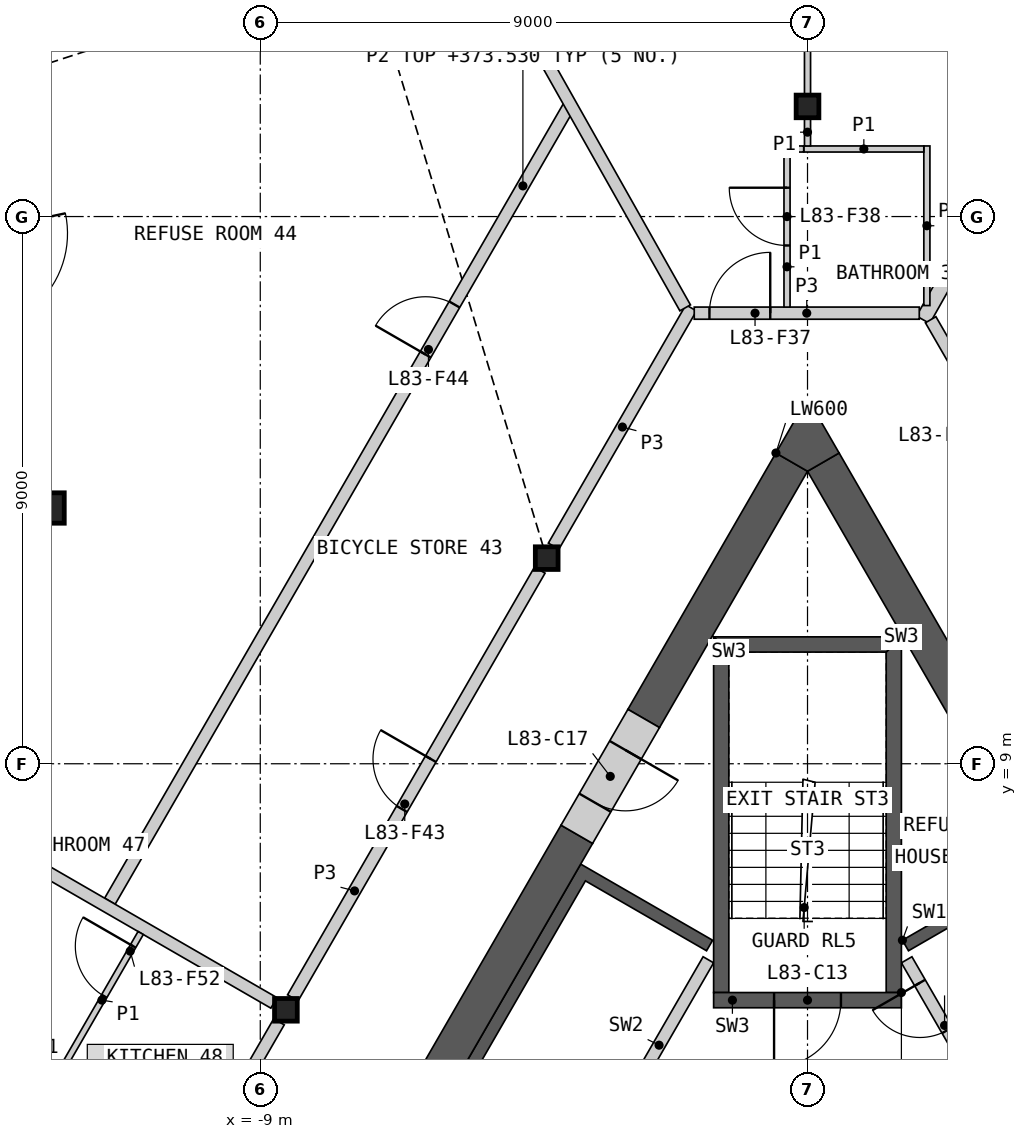
"""IFC4 building model, lengths in metres.
Left out: names, types, materials, properties, quantities, classifications, styles, units other than length and angle.
Written with IfcOpenShell. Run it as: python <this file> out.ifc"""

import sys

from ifc_helpers import new_model, si_unit, direction, frame, frame_2d, origin, origin_2d, place, context, subcontext, project, spatial, polyline, rectangle, hollow_rectangle, i_section, outline, extrude, element, fill, save


model = new_model("IFC4")
c1 = context("Model", 3, precision=1e-05, world=origin(), true_north=direction((0.0, 1.0)))
c2 = subcontext(c1, "Body", "Model", "MODEL_VIEW")
j1 = project(units=[si_unit("LENGTHUNIT", "METRE"), si_unit("PLANEANGLEUNIT", "RADIAN")], contexts=[c1])
p1 = place(None, origin())
s1 = spatial("IfcSite", under=j1, at=p1, CompositionType="ELEMENT")
p2 = place(p1, origin())
s2 = spatial("IfcBuilding", under=s1, at=p2, CompositionType="ELEMENT")
p3 = place(p2, frame((0.0, 0.0, 371.2)))
s3 = spatial("IfcBuildingStorey", under=s2, at=p3, CompositionType="ELEMENT", Elevation=371.2)
p4 = place(p3, frame((-12.474, 13.206, 0.0), z_axis=(0.0, 0.0, 1.0), x_axis=(1.0, 0.0, 0.0)))
e1 = element("IfcColumn", 1, at=p4, inside=s3, PredefinedType="COLUMN", context=c2, shape_type="SweptSolid", body=[
    extrude(hollow_rectangle(XDim=0.5, YDim=0.5, WallThickness=0.03, at=origin_2d()), origin(), (0.0, 0.0, 1.0), 3.4),
])
for number, where, z_axis, x_axis in (
    (2, (0.0, 19.811, 0.0), (0.0, 0.0, 1.0), (1.0, 0.0, 0.0)),
    (3, (-4.289, 12.382, 0.0), (0.0, 0.0, 1.0), (1.0, 0.0, 0.0)),
    (4, (-8.578, 4.953, 0.0), (0.0, 0.0, 1.0), (1.0, 0.0, 0.0)),
):
    element("IfcColumn", number, at=place(p3, frame(where, z_axis=z_axis, x_axis=x_axis)), inside=s3, PredefinedType="COLUMN", context=c2, shape_type="SweptSolid", body=[
        extrude(i_section(OverallWidth=0.374, OverallDepth=0.372, WebThickness=0.016, FlangeThickness=0.026, at=origin_2d()), origin(), (0.0, 0.0, 1.0), 3.4),
    ])
p5 = place(p3, origin())
e5 = element("IfcWall", 5, at=p5, inside=s3, PredefinedType="SHEAR", context=c2, shape_type="SweptSolid", body=[
    extrude(outline(polyline([(1.561, 6.097), (3.731, 7.35), (8.231, -0.444), (6.061, -1.697), (5.96, -1.524), (7.952, -0.374), (6.952, 1.358), (4.96, 0.208), (4.861, 0.381), (6.852, 1.531), (5.852, 3.263), (3.861, 2.113), (3.76, 2.287), (5.752, 3.437), (4.752, 5.169), (2.76, 4.019), (2.66, 4.192), (4.652, 5.342), (3.652, 7.074), (1.66, 5.924), (1.561, 6.097)])), origin(), (0.0, 0.0, 1.0), 3.1),
])
p6 = place(p3, frame((5.817, -1.476, 0.0), z_axis=(0.0, 0.0, 1.0), x_axis=(-0.500002616675, 0.866023893041, 0.0)))
e6 = element("IfcWall", 6, at=p6, inside=s3, PredefinedType="SOLIDWALL", context=c2, shape_type="SweptSolid", body=[
    extrude(rectangle(XDim=8.373, YDim=0.2, at=frame_2d((4.187, 0.0))), origin(), (0.0, 0.0, 1.0), 3.1),
])
p7 = place(p6, frame((0.337, 0.0, 0.0)))
e7 = element("IfcOpeningElement", 7, at=p7, cuts=e6, PredefinedType="OPENING", context=c2, shape_type="SweptSolid", body=[
    extrude(rectangle(XDim=1.1, YDim=2.1, at=frame_2d((0.55, 1.05))), frame((0.0, 0.11, 0.0), z_axis=(0.0, -1.0, 0.0), x_axis=(1.0, 0.0, 0.0)), (0.0, 0.0, 1.0), 0.22),
])
p8 = place(p6, frame((2.537, 0.0, 0.0)))
e8 = element("IfcOpeningElement", 8, at=p8, cuts=e6, PredefinedType="OPENING", context=c2, shape_type="SweptSolid", body=[
    extrude(rectangle(XDim=1.1, YDim=2.1, at=frame_2d((0.55, 1.05))), frame((0.0, 0.11, 0.0), z_axis=(0.0, -1.0, 0.0), x_axis=(1.0, 0.0, 0.0)), (0.0, 0.0, 1.0), 0.22),
])
p9 = place(p6, frame((4.737, 0.0, 0.0)))
e9 = element("IfcOpeningElement", 9, at=p9, cuts=e6, PredefinedType="OPENING", context=c2, shape_type="SweptSolid", body=[
    extrude(rectangle(XDim=1.1, YDim=2.1, at=frame_2d((0.55, 1.05))), frame((0.0, 0.11, 0.0), z_axis=(0.0, -1.0, 0.0), x_axis=(1.0, 0.0, 0.0)), (0.0, 0.0, 1.0), 0.22),
])
p10 = place(p6, frame((7.037, 0.0, 0.0)))
e10 = element("IfcOpeningElement", 10, at=p10, cuts=e6, PredefinedType="OPENING", context=c2, shape_type="SweptSolid", body=[
    extrude(rectangle(XDim=0.9, YDim=2.1, at=frame_2d((0.45, 1.05))), frame((0.0, 0.11, 0.0), z_axis=(0.0, -1.0, 0.0), x_axis=(1.0, 0.0, 0.0)), (0.0, 0.0, 1.0), 0.22),
])
p11 = place(p3, origin())
e11 = element("IfcWall", 11, at=p11, inside=s3, PredefinedType="SHEAR", context=c2, shape_type="SweptSolid", body=[
    extrude(outline(polyline([(-4.96, 0.208), (-7.131, 1.461), (-3.731, 7.35), (-1.561, 6.097), (-1.66, 5.924), (-3.652, 7.074), (-6.852, 1.531), (-4.861, 0.381), (-4.96, 0.208)])), origin(), (0.0, 0.0, 1.0), 3.1),
])
p12 = place(p3, frame((-1.631, 5.776, 0.0), z_axis=(0.0, 0.0, 1.0), x_axis=(-0.499992876559, -0.866029516466, 0.0)))
e12 = element("IfcWall", 12, at=p12, inside=s3, PredefinedType="SOLIDWALL", context=c2, shape_type="SweptSolid", body=[
    extrude(rectangle(XDim=6.486, YDim=0.2, at=frame_2d((3.243, 0.0))), origin(), (0.0, 0.0, 1.0), 3.1),
])
p13 = place(p12, frame((2.637, 0.0, 0.0)))
e13 = element("IfcOpeningElement", 13, at=p13, cuts=e12, PredefinedType="OPENING", context=c2, shape_type="SweptSolid", body=[
    extrude(rectangle(XDim=0.9, YDim=2.1, at=frame_2d((0.45, 1.05))), frame((0.0, 0.11, 0.0), z_axis=(0.0, -1.0, 0.0), x_axis=(1.0, 0.0, 0.0)), (0.0, 0.0, 1.0), 0.22),
])
p14 = place(p3, origin())
e14 = element("IfcWall", 14, at=p14, inside=s3, PredefinedType="SHEAR", context=c2, shape_type="SweptSolid", body=[
    extrude(outline(polyline([(1.544, 5.237), (1.544, 11.087), (1.294, 10.837), (1.294, 5.237), (1.544, 5.237)])), origin(), (0.0, 0.0, 1.0), 3.1),
])
p15 = place(p3, origin())
e15 = element("IfcWall", 15, at=p15, inside=s3, PredefinedType="SHEAR", context=c2, shape_type="SweptSolid", body=[
    extrude(outline(polyline([(1.544, 11.087), (-1.544, 11.087), (-1.294, 10.837), (1.294, 10.837), (1.544, 11.087)])), origin(), (0.0, 0.0, 1.0), 3.1),
])
p16 = place(p3, origin())
e16 = element("IfcWall", 16, at=p16, inside=s3, PredefinedType="SHEAR", context=c2, shape_type="SweptSolid", body=[
    extrude(outline(polyline([(-1.294, 10.837), (-1.544, 11.087), (-1.544, 5.237), (-1.294, 5.237), (-1.294, 10.837)])), origin(), (0.0, 0.0, 1.0), 3.1),
])
p17 = place(p3, frame((1.544, 5.112, 0.0), z_axis=(0.0, 0.0, 1.0), x_axis=(-1.0, 0.0, 0.0)))
e17 = element("IfcWall", 17, at=p17, inside=s3, PredefinedType="SHEAR", context=c2, shape_type="SweptSolid", body=[
    extrude(rectangle(XDim=3.088, YDim=0.25, at=frame_2d((1.544, 0.0))), origin(), (0.0, 0.0, 1.0), 3.1),
])
p18 = place(p17, frame((0.994, 0.0, 0.0)))
e18 = element("IfcOpeningElement", 18, at=p18, cuts=e17, PredefinedType="OPENING", context=c2, shape_type="SweptSolid", body=[
    extrude(rectangle(XDim=1.1, YDim=2.1, at=frame_2d((0.55, 1.05))), frame((0.0, 0.135, 0.0), z_axis=(0.0, -1.0, 0.0), x_axis=(1.0, 0.0, 0.0)), (0.0, 0.0, 1.0), 0.27),
])
p19 = place(p3, frame((8.686, -0.634, 0.0), z_axis=(0.0, 0.0, 1.0), x_axis=(-0.500004601921, 0.866022746848, 0.0)))
e19 = element("IfcWall", 19, at=p19, inside=s3, PredefinedType="SHEAR", context=c2, shape_type="SweptSolid", body=[
    extrude(rectangle(XDim=16.853, YDim=0.6, at=frame_2d((8.426, 0.0))), origin(), (0.0, 0.0, 1.0), 3.1),
])
p20 = place(p3, frame((-3.794, 7.84, 0.0), z_axis=(0.0, 0.0, 1.0), x_axis=(-0.499974747889, -0.866039982607, 0.0)))
e20 = element("IfcWall", 20, at=p20, inside=s3, PredefinedType="SHEAR", context=c2, shape_type="SweptSolid", body=[
    extrude(rectangle(XDim=7.092, YDim=0.6, at=frame_2d((3.546, 0.0))), origin(), (0.0, 0.0, 1.0), 3.1),
])
p21 = place(p3, frame((-0.26, 13.961, 0.0), z_axis=(0.0, 0.0, 1.0), x_axis=(-0.50000604952, -0.866021911064, 0.0)))
e21 = element("IfcWall", 21, at=p21, inside=s3, PredefinedType="SHEAR", context=c2, shape_type="SweptSolid", body=[
    extrude(rectangle(XDim=4.869, YDim=0.6, at=frame_2d((2.434, 0.0))), origin(), (0.0, 0.0, 1.0), 3.1),
])
p22 = place(p3, origin())
e22 = element("IfcWall", 22, at=p22, inside=s3, PredefinedType="SHEAR", context=c2, shape_type="SweptSolid", body=[
    extrude(outline(polyline([(-0.52, 14.111), (0.0, 15.011), (0.52, 14.111), (0.0, 13.811), (-0.52, 14.111)])), origin(), (0.0, 0.0, 1.0), 3.1),
])
p23 = place(p3, frame((-2.694, 9.745, 0.0), z_axis=(0.0, 0.0, 1.0), x_axis=(-0.50002983664, -0.866008176907, 0.0)))
e23 = element("IfcWall", 23, at=p23, inside=s3, PredefinedType="SHEAR", context=c2, shape_type="SweptSolid", body=[
    extrude(rectangle(XDim=2.2, YDim=0.6, at=frame_2d((1.1, 0.0))), origin(), (0.0, 0.0, 1.0), 3.1),
])
p24 = place(p23, frame((0.6, 0.0, 0.0)))
e24 = element("IfcOpeningElement", 24, at=p24, cuts=e23, PredefinedType="OPENING", context=c2, shape_type="SweptSolid", body=[
    extrude(rectangle(XDim=1.0, YDim=2.1, at=frame_2d((0.5, 1.05))), frame((0.0, 0.31, 0.0), z_axis=(0.0, -1.0, 0.0), x_axis=(1.0, 0.0, 0.0)), (0.0, 0.0, 1.0), 0.62),
])
p25 = place(p3, frame((1.902, 16.302, 0.0), z_axis=(0.0, 0.0, 1.0), x_axis=(0.491233789602, 0.871027763021, 0.0)))
e25 = element("IfcWall", 25, at=p25, inside=s3, PredefinedType="PARTITIONING", context=c2, shape_type="SweptSolid", body=[
    extrude(rectangle(XDim=14.345, YDim=0.25, at=frame_2d((7.173, 0.0))), origin(), (0.0, 0.0, 1.0), 2.33),
])
p26 = place(p3, frame((-8.465, 5.15, 0.0), z_axis=(0.0, 0.0, 1.0), x_axis=(0.499992155518, 0.866029932751, 0.0)))
e26 = element("IfcWall", 26, at=p26, inside=s3, PredefinedType="PARTITIONING", context=c2, shape_type="SweptSolid", body=[
    extrude(rectangle(XDim=8.123, YDim=0.2, at=frame_2d((4.062, 0.0))), origin(), (0.0, 0.0, 1.0), 3.1),
])
p27 = place(p26, frame((3.587, 0.0, 0.0)))
e27 = element("IfcOpeningElement", 27, at=p27, cuts=e26, PredefinedType="OPENING", context=c2, shape_type="SweptSolid", body=[
    extrude(rectangle(XDim=0.95, YDim=2.1, at=frame_2d((0.475, 1.05))), frame((0.0, 0.11, 0.0), z_axis=(0.0, -1.0, 0.0), x_axis=(1.0, 0.0, 0.0)), (0.0, 0.0, 1.0), 0.22),
])
p28 = place(p3, frame((-12.754, -2.279, 0.0), z_axis=(0.0, 0.0, 1.0), x_axis=(0.500001682468, 0.866024432409, 0.0)))
e28 = element("IfcWall", 28, at=p28, inside=s3, PredefinedType="PARTITIONING", context=c2, shape_type="SweptSolid", body=[
    extrude(rectangle(XDim=8.124, YDim=0.2, at=frame_2d((4.062, 0.0))), origin(), (0.0, 0.0, 1.0), 3.1),
])
p29 = place(p28, frame((3.762, 0.0, 0.0)))
e29 = element("IfcOpeningElement", 29, at=p29, cuts=e28, PredefinedType="OPENING", context=c2, shape_type="SweptSolid", body=[
    extrude(rectangle(XDim=1.0, YDim=2.1, at=frame_2d((0.5, 1.05))), frame((0.0, 0.11, 0.0), z_axis=(0.0, -1.0, 0.0), x_axis=(1.0, 0.0, 0.0)), (0.0, 0.0, 1.0), 0.22),
])
p30 = place(p3, frame((-4.176, 12.579, 0.0), z_axis=(0.0, 0.0, 1.0), x_axis=(0.499974648164, 0.866040040179, 0.0)))
e30 = element("IfcWall", 30, at=p30, inside=s3, PredefinedType="PARTITIONING", context=c2, shape_type="SweptSolid", body=[
    extrude(rectangle(XDim=4.525, YDim=0.2, at=frame_2d((2.263, 0.0))), origin(), (0.0, 0.0, 1.0), 3.1),
])
p31 = place(p3, frame((2.025, 16.303, 0.0), z_axis=(0.0, 0.0, 1.0), x_axis=(0.500004215162, -0.866022970146, 0.0)))
e31 = element("IfcWall", 31, at=p31, inside=s3, PredefinedType="PARTITIONING", context=c2, shape_type="SweptSolid", body=[
    extrude(rectangle(XDim=4.3, YDim=0.2, at=frame_2d((2.15, 0.0))), origin(), (0.0, 0.0, 1.0), 3.1),
])
p32 = place(p31, frame((0.75, 0.0, 0.0)))
e32 = element("IfcOpeningElement", 32, at=p32, cuts=e31, PredefinedType="OPENING", context=c2, shape_type="SweptSolid", body=[
    extrude(rectangle(XDim=1.0, YDim=2.1, at=frame_2d((0.5, 1.05))), frame((0.0, 0.11, 0.0), z_axis=(0.0, -1.0, 0.0), x_axis=(1.0, 0.0, 0.0)), (0.0, 0.0, 1.0), 0.22),
])
p33 = place(p3, frame((-1.863, 16.411, 0.0), z_axis=(0.0, 0.0, 1.0), x_axis=(1.0, 0.0, 0.0)))
e33 = element("IfcWall", 33, at=p33, inside=s3, PredefinedType="PARTITIONING", context=c2, shape_type="SweptSolid", body=[
    extrude(rectangle(XDim=3.701, YDim=0.2, at=frame_2d((1.851, 0.0))), origin(), (0.0, 0.0, 1.0), 3.1),
])
p34 = place(p33, frame((0.25, 0.0, 0.0)))
e34 = element("IfcOpeningElement", 34, at=p34, cuts=e33, PredefinedType="OPENING", context=c2, shape_type="SweptSolid", body=[
    extrude(rectangle(XDim=1.0, YDim=2.1, at=frame_2d((0.5, 1.05))), frame((0.0, 0.11, 0.0), z_axis=(0.0, -1.0, 0.0), x_axis=(1.0, 0.0, 0.0)), (0.0, 0.0, 1.0), 0.22),
])
p35 = place(p3, frame((-11.473, 6.74, 0.0), z_axis=(0.0, 0.0, 1.0), x_axis=(0.500001082559, 0.866024778768, 0.0)))
e35 = element("IfcWall", 35, at=p35, inside=s3, PredefinedType="PARTITIONING", context=c2, shape_type="SweptSolid", body=[
    extrude(rectangle(XDim=15.094, YDim=0.2, at=frame_2d((7.547, 0.0))), origin(), (0.0, 0.0, 1.0), 2.33),
])
p36 = place(p35, frame((10.383, 0.0, 0.0)))
e36 = element("IfcOpeningElement", 36, at=p36, cuts=e35, PredefinedType="OPENING", context=c2, shape_type="SweptSolid", body=[
    extrude(rectangle(XDim=0.95, YDim=2.1, at=frame_2d((0.475, 1.05))), frame((0.0, 0.11, 0.0), z_axis=(0.0, -1.0, 0.0), x_axis=(1.0, 0.0, 0.0)), (0.0, 0.0, 1.0), 0.22),
])
p37 = place(p3, frame((-8.865, 28.649, 0.0), z_axis=(0.0, 0.0, 1.0), x_axis=(0.491236420263, -0.871026279401, 0.0)))
e37 = element("IfcWall", 37, at=p37, inside=s3, PredefinedType="PARTITIONING", context=c2, shape_type="SweptSolid", body=[
    extrude(rectangle(XDim=13.95, YDim=0.2, at=frame_2d((6.975, 0.0))), origin(), (0.0, 0.0, 1.0), 2.33),
])
p38 = place(p3, frame((-18.869, 10.894, 0.0), z_axis=(0.0, 0.0, 1.0), x_axis=(0.866023724155, -0.500002909193, 0.0)))
e38 = element("IfcWall", 38, at=p38, inside=s3, PredefinedType="PARTITIONING", context=c2, shape_type="SweptSolid", body=[
    extrude(rectangle(XDim=11.655, YDim=0.2, at=frame_2d((5.827, 0.0))), origin(), (0.0, 0.0, 1.0), 2.33),
])
p39 = place(p3, frame((0.0, 20.008, 0.0), z_axis=(0.0, 0.0, 1.0), x_axis=(0.0, 1.0, 0.0)))
e39 = element("IfcWall", 39, at=p39, inside=s3, PredefinedType="PARTITIONING", context=c2, shape_type="SweptSolid", body=[
    extrude(rectangle(XDim=10.951, YDim=0.1, at=frame_2d((5.476, 0.0))), origin(), (0.0, 0.0, 1.0), 2.33),
])
p40 = place(p39, frame((8.851, 0.0, 0.0)))
e40 = element("IfcOpeningElement", 40, at=p40, cuts=e39, PredefinedType="OPENING", context=c2, shape_type="SweptSolid", body=[
    extrude(rectangle(XDim=0.95, YDim=2.1, at=frame_2d((0.475, 1.05))), frame((0.0, 0.06, 0.0), z_axis=(0.0, -1.0, 0.0), x_axis=(1.0, 0.0, 0.0)), (0.0, 0.0, 1.0), 0.12),
])
p41 = place(p3, frame((-15.318, 5.38, 0.0), z_axis=(0.0, 0.0, 1.0), x_axis=(0.866035260786, -0.499982926783, 0.0)))
e41 = element("IfcWall", 41, at=p41, inside=s3, PredefinedType="PARTITIONING", context=c2, shape_type="SweptSolid", body=[
    extrude(rectangle(XDim=5.95, YDim=0.1, at=frame_2d((2.975, 0.0))), origin(), (0.0, 0.0, 1.0), 2.33),
])
p42 = place(p3, frame((-14.735, 5.389, 0.0), z_axis=(0.0, 0.0, 1.0), x_axis=(0.866032775405, -0.499987231761, 0.0)))
e42 = element("IfcWall", 42, at=p42, inside=s3, PredefinedType="PARTITIONING", context=c2, shape_type="SweptSolid", body=[
    extrude(rectangle(XDim=2.9, YDim=0.1, at=frame_2d((1.45, 0.0))), origin(), (0.0, 0.0, 1.0), 2.33),
])
p43 = place(p3, frame((1.963, 16.536, 0.0), z_axis=(0.0, 0.0, 1.0), x_axis=(0.0, 1.0, 0.0)))
e43 = element("IfcWall", 43, at=p43, inside=s3, PredefinedType="PARTITIONING", context=c2, shape_type="SweptSolid", body=[
    extrude(rectangle(XDim=2.625, YDim=0.1, at=frame_2d((1.312, 0.0))), origin(), (0.0, 0.0, 1.0), 2.33),
])
p44 = place(p3, frame((-12.242, 4.008, 0.0), z_axis=(0.0, 0.0, 1.0), x_axis=(0.499948979701, 0.866054858364, 0.0)))
e44 = element("IfcWall", 44, at=p44, inside=s3, PredefinedType="PARTITIONING", context=c2, shape_type="SweptSolid", body=[
    extrude(rectangle(XDim=2.55, YDim=0.1, at=frame_2d((1.275, 0.0))), origin(), (0.0, 0.0, 1.0), 2.33),
])
p45 = place(p44, frame((1.35, 0.0, 0.0)))
e45 = element("IfcOpeningElement", 45, at=p45, cuts=e44, PredefinedType="OPENING", context=c2, shape_type="SweptSolid", body=[
    extrude(rectangle(XDim=0.95, YDim=2.1, at=frame_2d((0.475, 1.05))), frame((0.0, 0.06, 0.0), z_axis=(0.0, -1.0, 0.0), x_axis=(1.0, 0.0, 0.0)), (0.0, 0.0, 1.0), 0.12),
])
p46 = place(p3, frame((-0.337, 16.511, 0.0), z_axis=(0.0, 0.0, 1.0), x_axis=(0.0, 1.0, 0.0)))
e46 = element("IfcWall", 46, at=p46, inside=s3, PredefinedType="PARTITIONING", context=c2, shape_type="SweptSolid", body=[
    extrude(rectangle(XDim=2.649, YDim=0.1, at=frame_2d((1.325, 0.0))), origin(), (0.0, 0.0, 1.0), 2.33),
])
p47 = place(p46, frame((1.013, 0.0, 0.0)))
e47 = element("IfcOpeningElement", 47, at=p47, cuts=e46, PredefinedType="OPENING", context=c2, shape_type="SweptSolid", body=[
    extrude(rectangle(XDim=0.95, YDim=2.1, at=frame_2d((0.475, 1.05))), frame((0.0, 0.06, 0.0), z_axis=(0.0, -1.0, 0.0), x_axis=(1.0, 0.0, 0.0)), (0.0, 0.0, 1.0), 0.12),
])
p48 = place(p3, frame((-0.06, 19.111, 0.0), z_axis=(0.0, 0.0, 1.0), x_axis=(1.0, 0.0, 0.0)))
e48 = element("IfcWall", 48, at=p48, inside=s3, PredefinedType="PARTITIONING", context=c2, shape_type="SweptSolid", body=[
    extrude(rectangle(XDim=1.973, YDim=0.1, at=frame_2d((0.987, 0.0))), origin(), (0.0, 0.0, 1.0), 2.33),
])
p49 = place(p3, frame((0.0, 19.161, 0.0), z_axis=(0.0, 0.0, 1.0), x_axis=(0.0, 1.0, 0.0)))
e49 = element("IfcWall", 49, at=p49, inside=s3, PredefinedType="PARTITIONING", context=c2, shape_type="SweptSolid", body=[
    extrude(rectangle(XDim=0.453, YDim=0.1, at=frame_2d((0.227, 0.0))), origin(), (0.0, 0.0, 1.0), 2.33),
])
p50 = place(p3, frame((-0.287, 19.11, 0.0), z_axis=(0.0, 0.0, 1.0), x_axis=(0.999994683407, 0.003260852229, 0.0)))
e50 = element("IfcWall", 50, at=p50, inside=s3, PredefinedType="PARTITIONING", context=c2, shape_type="SweptSolid", body=[
    extrude(rectangle(XDim=0.225, YDim=0.1, at=frame_2d((0.112, 0.0))), origin(), (0.0, 0.0, 1.0), 2.33),
])
p51 = place(p10, origin())
e51 = element("IfcDoor", 51, at=p51, inside=s3, OperationType="SINGLE_SWING_RIGHT", PredefinedType="DOOR", context=c2, shape_type="SweptSolid", body=[
    extrude(rectangle(XDim=0.9, YDim=2.1, at=frame_2d((0.45, 1.05))), frame((0.0, 0.025, 0.0), z_axis=(0.0, -1.0, 0.0), x_axis=(1.0, 0.0, 0.0)), (0.0, 0.0, 1.0), 0.05),
])
fill(e10, e51)
p52 = place(p18, origin())
e52 = element("IfcDoor", 52, at=p52, inside=s3, OperationType="SINGLE_SWING_RIGHT", PredefinedType="DOOR", context=c2, shape_type="SweptSolid", body=[
    extrude(rectangle(XDim=1.1, YDim=2.1, at=frame_2d((0.55, 1.05))), frame((0.0, 0.025, 0.0), z_axis=(0.0, -1.0, 0.0), x_axis=(1.0, 0.0, 0.0)), (0.0, 0.0, 1.0), 0.05),
])
fill(e18, e52)
p53 = place(p24, origin())
e53 = element("IfcDoor", 53, at=p53, inside=s3, OperationType="SINGLE_SWING_LEFT", PredefinedType="DOOR", context=c2, shape_type="SweptSolid", body=[
    extrude(rectangle(XDim=1.0, YDim=2.1, at=frame_2d((0.5, 1.05))), frame((0.0, 0.055, 0.0), z_axis=(0.0, -1.0, 0.0), x_axis=(1.0, 0.0, 0.0)), (0.0, 0.0, 1.0), 0.05),
])
fill(e24, e53)
p54 = place(p34, origin())
e54 = element("IfcDoor", 54, at=p54, inside=s3, OperationType="SINGLE_SWING_RIGHT", PredefinedType="DOOR", context=c2, shape_type="SweptSolid", body=[
    extrude(rectangle(XDim=1.0, YDim=2.1, at=frame_2d((0.5, 1.05))), frame((0.0, 0.025, 0.0), z_axis=(0.0, -1.0, 0.0), x_axis=(1.0, 0.0, 0.0)), (0.0, 0.0, 1.0), 0.05),
])
fill(e34, e54)
p55 = place(p47, origin())
e55 = element("IfcDoor", 55, at=p55, inside=s3, OperationType="SINGLE_SWING_RIGHT", PredefinedType="DOOR", context=c2, shape_type="SweptSolid", body=[
    extrude(rectangle(XDim=0.95, YDim=2.1, at=frame_2d((0.475, 1.05))), frame((0.0, 0.025, 0.0), z_axis=(0.0, -1.0, 0.0), x_axis=(1.0, 0.0, 0.0)), (0.0, 0.0, 1.0), 0.05),
])
fill(e47, e55)
p56 = place(p27, origin())
e56 = element("IfcDoor", 56, at=p56, inside=s3, OperationType="SINGLE_SWING_RIGHT", PredefinedType="DOOR", context=c2, shape_type="SweptSolid", body=[
    extrude(rectangle(XDim=0.95, YDim=2.1, at=frame_2d((0.475, 1.05))), frame((0.0, 0.025, 0.0), z_axis=(0.0, -1.0, 0.0), x_axis=(1.0, 0.0, 0.0)), (0.0, 0.0, 1.0), 0.05),
])
fill(e27, e56)
p57 = place(p36, origin())
e57 = element("IfcDoor", 57, at=p57, inside=s3, OperationType="SINGLE_SWING_LEFT", PredefinedType="DOOR", context=c2, shape_type="SweptSolid", body=[
    extrude(rectangle(XDim=0.95, YDim=2.1, at=frame_2d((0.475, 1.05))), frame((0.0, 0.025, 0.0), z_axis=(0.0, -1.0, 0.0), x_axis=(1.0, 0.0, 0.0)), (0.0, 0.0, 1.0), 0.05),
])
fill(e36, e57)
p58 = place(p45, origin())
e58 = element("IfcDoor", 58, at=p58, inside=s3, OperationType="SINGLE_SWING_RIGHT", PredefinedType="DOOR", context=c2, shape_type="SweptSolid", body=[
    extrude(rectangle(XDim=0.95, YDim=2.1, at=frame_2d((0.475, 1.05))), frame((0.0, 0.025, 0.0), z_axis=(0.0, -1.0, 0.0), x_axis=(1.0, 0.0, 0.0)), (0.0, 0.0, 1.0), 0.05),
])
fill(e45, e58)
save(model, sys.argv[1])
